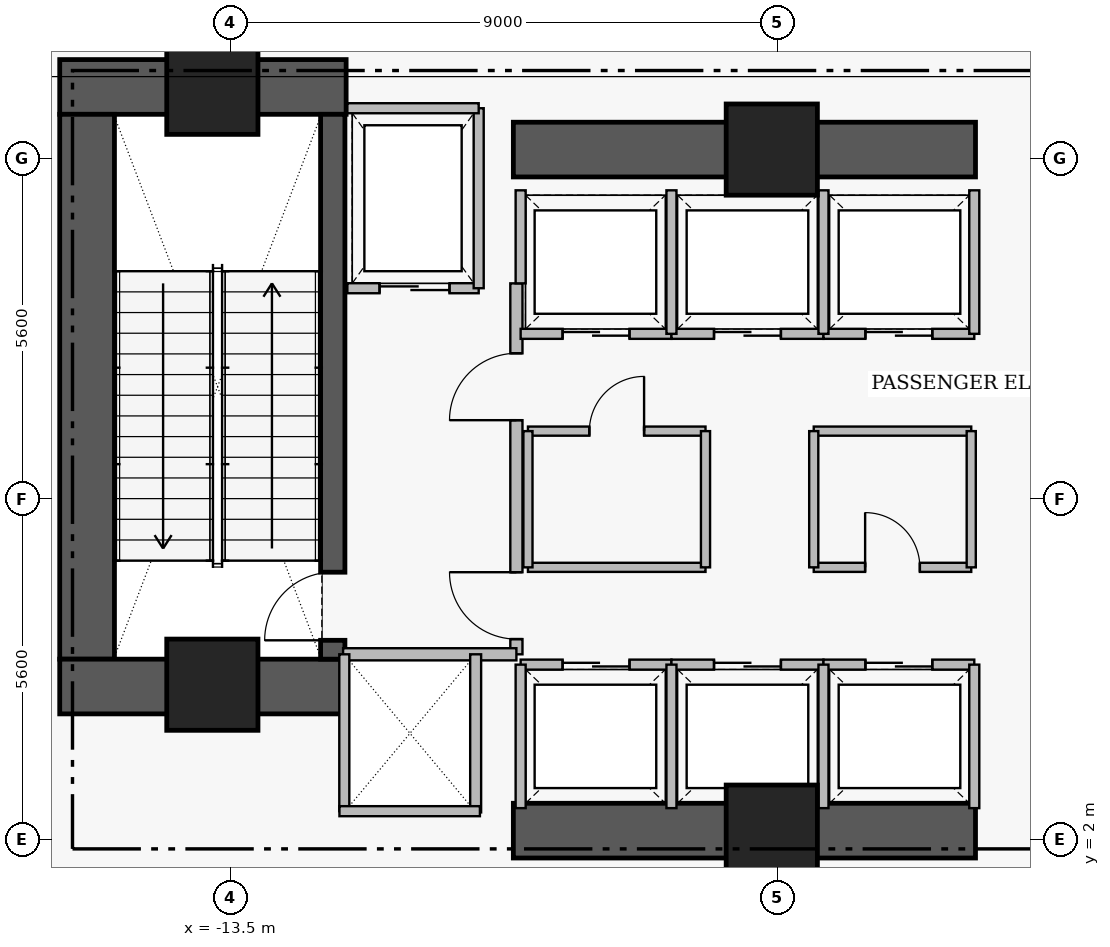
"""IFC4 building model, lengths in metres.
Left out: names, types, materials, properties, quantities, classifications, styles, units other than length and angle.
Written with IfcOpenShell. Run it as: python <this file> out.ifc"""

import sys

from ifc_helpers import new_model, si_unit, direction, frame, frame_2d, origin, origin_2d, place, context, subcontext, project, spatial, rectangle, extrude, element, fill, save


model = new_model("IFC4")
c1 = context("Model", 3, precision=1e-05, world=origin(), true_north=direction((0.0, 1.0)))
c2 = subcontext(c1, "Body", "Model", "MODEL_VIEW")
j1 = project(units=[si_unit("LENGTHUNIT", "METRE"), si_unit("PLANEANGLEUNIT", "RADIAN")], contexts=[c1])
p1 = place(None, origin())
s1 = spatial("IfcSite", under=j1, at=p1, CompositionType="ELEMENT")
p2 = place(p1, origin())
s2 = spatial("IfcBuilding", under=s1, at=p2, CompositionType="ELEMENT")
p3 = place(p2, frame((0.0, 0.0, 6.0)))
s3 = spatial("IfcBuildingStorey", under=s2, at=p3, CompositionType="ELEMENT", Elevation=6.0)
p4 = place(p3, frame((-16.31, 14.38, 0.0), z_axis=(0.0, 0.0, 1.0), x_axis=(1.0, 0.0, 0.0)))
e1 = element("IfcWall", 1, at=p4, inside=s3, PredefinedType="SHEAR", context=c2, shape_type="SweptSolid", body=[
    extrude(rectangle(XDim=4.71, YDim=0.9, at=frame_2d((2.355, 0.0))), origin(), (0.0, 0.0, 1.0), 5.21),
])
p5 = place(p3, frame((-15.86, 4.97, 0.0), z_axis=(0.0, 0.0, 1.0), x_axis=(0.0, 1.0, 0.0)))
e2 = element("IfcWall", 2, at=p5, inside=s3, PredefinedType="SHEAR", context=c2, shape_type="SweptSolid", body=[
    extrude(rectangle(XDim=8.96, YDim=0.9, at=frame_2d((4.48, 0.0))), origin(), (0.0, 0.0, 1.0), 5.21),
])
p6 = place(p3, frame((-16.31, 4.52, 0.0), z_axis=(0.0, 0.0, 1.0), x_axis=(1.0, 0.0, 0.0)))
e3 = element("IfcWall", 3, at=p6, inside=s3, PredefinedType="SHEAR", context=c2, shape_type="SweptSolid", body=[
    extrude(rectangle(XDim=4.71, YDim=0.9, at=frame_2d((2.355, 0.0))), origin(), (0.0, 0.0, 1.0), 5.21),
])
for number, where, z_axis, x_axis in (
    (4, (-8.85, 2.15, 0.0), (0.0, 0.0, 1.0), (1.0, 0.0, 0.0)),
    (5, (-8.85, 13.35, 0.0), (0.0, 0.0, 1.0), (1.0, 0.0, 0.0)),
):
    element("IfcWall", number, at=place(p3, frame(where, z_axis=z_axis, x_axis=x_axis)), inside=s3, PredefinedType="SHEAR", context=c2, shape_type="SweptSolid", body=[
        extrude(rectangle(XDim=7.6, YDim=0.9, at=frame_2d((3.8, 0.0))), origin(), (0.0, 0.0, 1.0), 5.14),
    ])
p7 = place(p3, frame((-11.82, 4.97, 0.0), z_axis=(0.0, 0.0, 1.0), x_axis=(0.0, 1.0, 0.0)))
e6 = element("IfcWall", 6, at=p7, inside=s3, PredefinedType="SHEAR", context=c2, shape_type="SweptSolid", body=[
    extrude(rectangle(XDim=8.96, YDim=0.4, at=frame_2d((4.48, 0.0))), origin(), (0.0, 0.0, 1.0), 5.21),
])
p8 = place(p7, frame((0.31, 0.0, 0.0)))
e7 = element("IfcOpeningElement", 7, at=p8, cuts=e6, PredefinedType="OPENING", context=c2, shape_type="SweptSolid", body=[
    extrude(rectangle(XDim=1.12, YDim=2.22, at=frame_2d((0.56, 1.11))), frame((0.0, 0.21, 0.0), z_axis=(0.0, -1.0, 0.0), x_axis=(1.0, 0.0, 0.0)), (0.0, 0.0, 1.0), 0.42),
])
for number, where, z_axis, x_axis in (
    (8, (-13.8, 14.35, 0.0), (0.0, 0.0, 1.0), (1.0, 0.0, 0.0)),
    (9, (-4.6, 13.35, 0.0), (0.0, 0.0, 1.0), (1.0, 0.0, 0.0)),
    (10, (-13.8, 4.55, 0.0), (0.0, 0.0, 1.0), (1.0, 0.0, 0.0)),
    (11, (-4.6, 2.15, 0.0), (0.0, 0.0, 1.0), (1.0, 0.0, 0.0)),
):
    element("IfcColumn", number, at=place(p3, frame(where, z_axis=z_axis, x_axis=x_axis)), inside=s3, PredefinedType="COLUMN", context=c2, shape_type="SweptSolid", body=[
        extrude(rectangle(XDim=1.5, YDim=1.5, at=origin_2d()), origin(), (0.0, 0.0, 1.0), 5.4),
    ])
p9 = place(p3, frame((-8.8, 5.05, 0.0), z_axis=(0.0, 0.0, 1.0), x_axis=(0.0, 1.0, 0.0)))
e12 = element("IfcWall", 12, at=p9, inside=s3, PredefinedType="PARTITIONING", context=c2, shape_type="SweptSolid", body=[
    extrude(rectangle(XDim=6.1, YDim=0.2, at=frame_2d((3.05, 0.0))), origin(), (0.0, 0.0, 1.0), 5.14),
])
p10 = place(p9, frame((0.25, 0.0, 0.0)))
e13 = element("IfcOpeningElement", 13, at=p10, cuts=e12, PredefinedType="OPENING", context=c2, shape_type="SweptSolid", body=[
    extrude(rectangle(XDim=1.1, YDim=2.2, at=frame_2d((0.55, 1.1))), frame((0.0, 0.11, 0.0), z_axis=(0.0, -1.0, 0.0), x_axis=(1.0, 0.0, 0.0)), (0.0, 0.0, 1.0), 0.22),
])
p11 = place(p9, frame((3.85, 0.0, 0.0)))
e14 = element("IfcOpeningElement", 14, at=p11, cuts=e12, PredefinedType="OPENING", context=c2, shape_type="SweptSolid", body=[
    extrude(rectangle(XDim=1.1, YDim=2.2, at=frame_2d((0.55, 1.1))), frame((0.0, 0.11, 0.0), z_axis=(0.0, -1.0, 0.0), x_axis=(1.0, 0.0, 0.0)), (0.0, 0.0, 1.0), 0.22),
])
p12 = place(p3, frame((-11.58, 11.07, 0.0), z_axis=(0.0, 0.0, 1.0), x_axis=(1.0, 0.0, 0.0)))
e15 = element("IfcWall", 15, at=p12, inside=s3, PredefinedType="PARTITIONING", context=c2, shape_type="SweptSolid", body=[
    extrude(rectangle(XDim=2.16, YDim=0.165, at=frame_2d((1.08, 0.0))), origin(), (0.0, 0.0, 1.0), 5.14),
])
p13 = place(p12, frame((0.53, 0.0, 0.0)))
e16 = element("IfcOpeningElement", 16, at=p13, cuts=e15, PredefinedType="OPENING", context=c2, shape_type="SweptSolid", body=[
    extrude(rectangle(XDim=1.15, YDim=2.25, at=frame_2d((0.575, 1.125))), frame((0.0, 0.093, 0.0), z_axis=(0.0, -1.0, 0.0), x_axis=(1.0, 0.0, 0.0)), (0.0, 0.0, 1.0), 0.185),
])
p14 = place(p3, frame((-8.73, 4.88, 0.0), z_axis=(0.0, 0.0, 1.0), x_axis=(1.0, 0.0, 0.0)))
e17 = element("IfcWall", 17, at=p14, inside=s3, PredefinedType="PARTITIONING", context=c2, shape_type="SweptSolid", body=[
    extrude(rectangle(XDim=2.48, YDim=0.165, at=frame_2d((1.24, 0.0))), origin(), (0.0, 0.0, 1.0), 5.14),
])
p15 = place(p14, frame((0.69, 0.0, 0.0)))
e18 = element("IfcOpeningElement", 18, at=p15, cuts=e17, PredefinedType="OPENING", context=c2, shape_type="SweptSolid", body=[
    extrude(rectangle(XDim=1.1, YDim=2.25, at=frame_2d((0.55, 1.125))), frame((0.0, 0.093, 0.0), z_axis=(0.0, -1.0, 0.0), x_axis=(1.0, 0.0, 0.0)), (0.0, 0.0, 1.0), 0.185),
])
p16 = place(p3, frame((-6.25, 4.88, 0.0), z_axis=(0.0, 0.0, 1.0), x_axis=(1.0, 0.0, 0.0)))
e19 = element("IfcWall", 19, at=p16, inside=s3, PredefinedType="PARTITIONING", context=c2, shape_type="SweptSolid", body=[
    extrude(rectangle(XDim=2.5, YDim=0.165, at=frame_2d((1.25, 0.0))), origin(), (0.0, 0.0, 1.0), 5.14),
])
p17 = place(p16, frame((0.7, 0.0, 0.0)))
e20 = element("IfcOpeningElement", 20, at=p17, cuts=e19, PredefinedType="OPENING", context=c2, shape_type="SweptSolid", body=[
    extrude(rectangle(XDim=1.1, YDim=2.25, at=frame_2d((0.55, 1.125))), frame((0.0, 0.093, 0.0), z_axis=(0.0, -1.0, 0.0), x_axis=(1.0, 0.0, 0.0)), (0.0, 0.0, 1.0), 0.185),
])
p18 = place(p3, frame((-8.73, 10.32, 0.0), z_axis=(0.0, 0.0, 1.0), x_axis=(1.0, 0.0, 0.0)))
e21 = element("IfcWall", 21, at=p18, inside=s3, PredefinedType="PARTITIONING", context=c2, shape_type="SweptSolid", body=[
    extrude(rectangle(XDim=2.48, YDim=0.165, at=frame_2d((1.24, 0.0))), origin(), (0.0, 0.0, 1.0), 5.14),
])
p19 = place(p18, frame((0.69, 0.0, 0.0)))
e22 = element("IfcOpeningElement", 22, at=p19, cuts=e21, PredefinedType="OPENING", context=c2, shape_type="SweptSolid", body=[
    extrude(rectangle(XDim=1.1, YDim=2.25, at=frame_2d((0.55, 1.125))), frame((0.0, 0.093, 0.0), z_axis=(0.0, -1.0, 0.0), x_axis=(1.0, 0.0, 0.0)), (0.0, 0.0, 1.0), 0.185),
])
p20 = place(p3, frame((-6.25, 10.32, 0.0), z_axis=(0.0, 0.0, 1.0), x_axis=(1.0, 0.0, 0.0)))
e23 = element("IfcWall", 23, at=p20, inside=s3, PredefinedType="PARTITIONING", context=c2, shape_type="SweptSolid", body=[
    extrude(rectangle(XDim=2.5, YDim=0.165, at=frame_2d((1.25, 0.0))), origin(), (0.0, 0.0, 1.0), 5.14),
])
p21 = place(p20, frame((0.7, 0.0, 0.0)))
e24 = element("IfcOpeningElement", 24, at=p21, cuts=e23, PredefinedType="OPENING", context=c2, shape_type="SweptSolid", body=[
    extrude(rectangle(XDim=1.1, YDim=2.25, at=frame_2d((0.55, 1.125))), frame((0.0, 0.093, 0.0), z_axis=(0.0, -1.0, 0.0), x_axis=(1.0, 0.0, 0.0)), (0.0, 0.0, 1.0), 0.185),
])
p22 = place(p3, frame((-3.75, 4.88, 0.0), z_axis=(0.0, 0.0, 1.0), x_axis=(1.0, 0.0, 0.0)))
e25 = element("IfcWall", 25, at=p22, inside=s3, PredefinedType="PARTITIONING", context=c2, shape_type="SweptSolid", body=[
    extrude(rectangle(XDim=2.48, YDim=0.165, at=frame_2d((1.24, 0.0))), origin(), (0.0, 0.0, 1.0), 5.14),
])
p23 = place(p22, frame((0.69, 0.0, 0.0)))
e26 = element("IfcOpeningElement", 26, at=p23, cuts=e25, PredefinedType="OPENING", context=c2, shape_type="SweptSolid", body=[
    extrude(rectangle(XDim=1.1, YDim=2.25, at=frame_2d((0.55, 1.125))), frame((0.0, 0.093, 0.0), z_axis=(0.0, -1.0, 0.0), x_axis=(1.0, 0.0, 0.0)), (0.0, 0.0, 1.0), 0.185),
])
p24 = place(p3, frame((-3.75, 10.32, 0.0), z_axis=(0.0, 0.0, 1.0), x_axis=(1.0, 0.0, 0.0)))
e27 = element("IfcWall", 27, at=p24, inside=s3, PredefinedType="PARTITIONING", context=c2, shape_type="SweptSolid", body=[
    extrude(rectangle(XDim=2.48, YDim=0.165, at=frame_2d((1.24, 0.0))), origin(), (0.0, 0.0, 1.0), 5.14),
])
p25 = place(p24, frame((0.69, 0.0, 0.0)))
e28 = element("IfcOpeningElement", 28, at=p25, cuts=e27, PredefinedType="OPENING", context=c2, shape_type="SweptSolid", body=[
    extrude(rectangle(XDim=1.1, YDim=2.25, at=frame_2d((0.55, 1.125))), frame((0.0, 0.093, 0.0), z_axis=(0.0, -1.0, 0.0), x_axis=(1.0, 0.0, 0.0)), (0.0, 0.0, 1.0), 0.185),
])
p26 = place(p3, frame((-8.61, 8.72, 0.0), z_axis=(0.0, 0.0, 1.0), x_axis=(1.0, 0.0, 0.0)))
e29 = element("IfcWall", 29, at=p26, inside=s3, PredefinedType="PARTITIONING", context=c2, shape_type="SweptSolid", body=[
    extrude(rectangle(XDim=2.92, YDim=0.15, at=frame_2d((1.46, 0.0))), origin(), (0.0, 0.0, 1.0), 5.14),
])
p27 = place(p26, frame((1.01, 0.0, 0.0)))
e30 = element("IfcOpeningElement", 30, at=p27, cuts=e29, PredefinedType="OPENING", context=c2, shape_type="SweptSolid", body=[
    extrude(rectangle(XDim=0.9, YDim=2.15, at=frame_2d((0.45, 1.075))), frame((0.0, 0.085, 0.0), z_axis=(0.0, -1.0, 0.0), x_axis=(1.0, 0.0, 0.0)), (0.0, 0.0, 1.0), 0.17),
])
p28 = place(p3, frame((-3.91, 6.48, 0.0), z_axis=(0.0, 0.0, 1.0), x_axis=(1.0, 0.0, 0.0)))
e31 = element("IfcWall", 31, at=p28, inside=s3, PredefinedType="PARTITIONING", context=c2, shape_type="SweptSolid", body=[
    extrude(rectangle(XDim=2.59, YDim=0.15, at=frame_2d((1.295, 0.0))), origin(), (0.0, 0.0, 1.0), 5.14),
])
p29 = place(p28, frame((0.845, 0.0, 0.0)))
e32 = element("IfcOpeningElement", 32, at=p29, cuts=e31, PredefinedType="OPENING", context=c2, shape_type="SweptSolid", body=[
    extrude(rectangle(XDim=0.9, YDim=2.15, at=frame_2d((0.45, 1.075))), frame((0.0, 0.085, 0.0), z_axis=(0.0, -1.0, 0.0), x_axis=(1.0, 0.0, 0.0)), (0.0, 0.0, 1.0), 0.17),
])
p30 = place(p3, frame((-11.65, 5.05, 0.0), z_axis=(0.0, 0.0, 1.0), x_axis=(1.0, 0.0, 0.0)))
e33 = element("IfcWall", 33, at=p30, inside=s3, PredefinedType="PARTITIONING", context=c2, shape_type="SweptSolid", body=[
    extrude(rectangle(XDim=2.85, YDim=0.2, at=frame_2d((1.425, 0.0))), origin(), (0.0, 0.0, 1.0), 5.14),
])
p31 = place(p3, frame((-9.42, 11.07, 0.0), z_axis=(0.0, 0.0, 1.0), x_axis=(0.0, 1.0, 0.0)))
e34 = element("IfcWall", 34, at=p31, inside=s3, PredefinedType="PARTITIONING", context=c2, shape_type="SweptSolid", body=[
    extrude(rectangle(XDim=2.96, YDim=0.165, at=frame_2d((1.48, 0.0))), origin(), (0.0, 0.0, 1.0), 5.14),
])
p32 = place(p3, frame((-11.58, 14.03, 0.0), z_axis=(0.0, 0.0, 1.0), x_axis=(1.0, 0.0, 0.0)))
e35 = element("IfcWall", 35, at=p32, inside=s3, PredefinedType="PARTITIONING", context=c2, shape_type="SweptSolid", body=[
    extrude(rectangle(XDim=2.16, YDim=0.165, at=frame_2d((1.08, 0.0))), origin(), (0.0, 0.0, 1.0), 5.14),
])
for number, where, z_axis, x_axis in (
    (36, (-8.73, 2.52, 0.0), (0.0, 0.0, 1.0), (0.0, 1.0, 0.0)),
    (37, (-6.25, 2.52, 0.0), (0.0, 0.0, 1.0), (0.0, 1.0, 0.0)),
    (38, (-3.75, 2.52, 0.0), (0.0, 0.0, 1.0), (0.0, 1.0, 0.0)),
):
    element("IfcWall", number, at=place(p3, frame(where, z_axis=z_axis, x_axis=x_axis)), inside=s3, PredefinedType="PARTITIONING", context=c2, shape_type="SweptSolid", body=[
        extrude(rectangle(XDim=2.36, YDim=0.165, at=frame_2d((1.18, 0.0))), origin(), (0.0, 0.0, 1.0), 5.14),
    ])
p33 = place(p3, frame((-8.73, 11.15, 0.0), z_axis=(0.0, 0.0, 1.0), x_axis=(0.0, 1.0, 0.0)))
e39 = element("IfcWall", 39, at=p33, inside=s3, PredefinedType="PARTITIONING", context=c2, shape_type="SweptSolid", body=[
    extrude(rectangle(XDim=1.53, YDim=0.165, at=frame_2d((0.765, 0.0))), origin(), (0.0, 0.0, 1.0), 5.14),
])
for number, where, z_axis, x_axis in (
    (40, (-6.25, 10.32, 0.0), (0.0, 0.0, 1.0), (0.0, 1.0, 0.0)),
    (41, (-3.75, 10.32, 0.0), (0.0, 0.0, 1.0), (0.0, 1.0, 0.0)),
    (42, (-1.27, 2.52, 0.0), (0.0, 0.0, 1.0), (0.0, 1.0, 0.0)),
    (43, (-1.27, 10.32, 0.0), (0.0, 0.0, 1.0), (0.0, 1.0, 0.0)),
):
    element("IfcWall", number, at=place(p3, frame(where, z_axis=z_axis, x_axis=x_axis)), inside=s3, PredefinedType="PARTITIONING", context=c2, shape_type="SweptSolid", body=[
        extrude(rectangle(XDim=2.36, YDim=0.165, at=frame_2d((1.18, 0.0))), origin(), (0.0, 0.0, 1.0), 5.14),
    ])
p34 = place(p3, frame((-9.47, 2.45, 0.0), z_axis=(0.0, 0.0, 1.0), x_axis=(0.0, 1.0, 0.0)))
e44 = element("IfcWall", 44, at=p34, inside=s3, PredefinedType="PARTITIONING", context=c2, shape_type="SweptSolid", body=[
    extrude(rectangle(XDim=2.6, YDim=0.18, at=frame_2d((1.3, 0.0))), origin(), (0.0, 0.0, 1.0), 5.14),
])
p35 = place(p3, frame((-11.63, 2.47, 0.0), z_axis=(0.0, 0.0, 1.0), x_axis=(0.0, 1.0, 0.0)))
e45 = element("IfcWall", 45, at=p35, inside=s3, PredefinedType="PARTITIONING", context=c2, shape_type="SweptSolid", body=[
    extrude(rectangle(XDim=2.58, YDim=0.165, at=frame_2d((1.29, 0.0))), origin(), (0.0, 0.0, 1.0), 5.14),
])
p36 = place(p3, frame((-11.71, 2.47, 0.0), z_axis=(0.0, 0.0, 1.0), x_axis=(1.0, 0.0, 0.0)))
e46 = element("IfcWall", 46, at=p36, inside=s3, PredefinedType="PARTITIONING", context=c2, shape_type="SweptSolid", body=[
    extrude(rectangle(XDim=2.31, YDim=0.165, at=frame_2d((1.155, 0.0))), origin(), (0.0, 0.0, 1.0), 3.74),
])
p37 = place(p3, frame((-8.61, 6.48, 0.0), z_axis=(0.0, 0.0, 1.0), x_axis=(1.0, 0.0, 0.0)))
e47 = element("IfcWall", 47, at=p37, inside=s3, PredefinedType="PARTITIONING", context=c2, shape_type="SweptSolid", body=[
    extrude(rectangle(XDim=2.92, YDim=0.15, at=frame_2d((1.46, 0.0))), origin(), (0.0, 0.0, 1.0), 5.14),
])
for number, where, z_axis, x_axis in (
    (48, (-8.61, 6.48, 0.0), (0.0, 0.0, 1.0), (0.0, 1.0, 0.0)),
    (49, (-5.69, 6.48, 0.0), (0.0, 0.0, 1.0), (0.0, 1.0, 0.0)),
):
    element("IfcWall", number, at=place(p3, frame(where, z_axis=z_axis, x_axis=x_axis)), inside=s3, PredefinedType="PARTITIONING", context=c2, shape_type="SweptSolid", body=[
        extrude(rectangle(XDim=2.24, YDim=0.15, at=frame_2d((1.12, 0.0))), origin(), (0.0, 0.0, 1.0), 5.14),
    ])
p38 = place(p3, frame((-3.91, 8.72, 0.0), z_axis=(0.0, 0.0, 1.0), x_axis=(1.0, 0.0, 0.0)))
e50 = element("IfcWall", 50, at=p38, inside=s3, PredefinedType="PARTITIONING", context=c2, shape_type="SweptSolid", body=[
    extrude(rectangle(XDim=2.59, YDim=0.15, at=frame_2d((1.295, 0.0))), origin(), (0.0, 0.0, 1.0), 5.14),
])
for number, where, z_axis, x_axis in (
    (51, (-3.91, 6.48, 0.0), (0.0, 0.0, 1.0), (0.0, 1.0, 0.0)),
    (52, (-1.32, 6.48, 0.0), (0.0, 0.0, 1.0), (0.0, 1.0, 0.0)),
):
    element("IfcWall", number, at=place(p3, frame(where, z_axis=z_axis, x_axis=x_axis)), inside=s3, PredefinedType="PARTITIONING", context=c2, shape_type="SweptSolid", body=[
        extrude(rectangle(XDim=2.24, YDim=0.15, at=frame_2d((1.12, 0.0))), origin(), (0.0, 0.0, 1.0), 5.14),
    ])
p39 = place(p8, origin())
e53 = element("IfcDoor", 53, at=p39, inside=s3, OperationType="SINGLE_SWING_LEFT", PredefinedType="DOOR", context=c2, shape_type="SweptSolid", body=[
    extrude(rectangle(XDim=1.12, YDim=2.22, at=frame_2d((0.56, 1.11))), frame((0.0, 0.025, 0.0), z_axis=(0.0, -1.0, 0.0), x_axis=(1.0, 0.0, 0.0)), (0.0, 0.0, 1.0), 0.05),
])
fill(e7, e53)
p40 = place(p10, origin())
e54 = element("IfcDoor", 54, at=p40, inside=s3, OperationType="SINGLE_SWING_RIGHT", PredefinedType="DOOR", context=c2, shape_type="SweptSolid", body=[
    extrude(rectangle(XDim=1.1, YDim=2.2, at=frame_2d((0.55, 1.1))), frame((0.0, 0.025, 0.0), z_axis=(0.0, -1.0, 0.0), x_axis=(1.0, 0.0, 0.0)), (0.0, 0.0, 1.0), 0.05),
])
fill(e13, e54)
p41 = place(p11, origin())
e55 = element("IfcDoor", 55, at=p41, inside=s3, OperationType="SINGLE_SWING_LEFT", PredefinedType="DOOR", context=c2, shape_type="SweptSolid", body=[
    extrude(rectangle(XDim=1.1, YDim=2.2, at=frame_2d((0.55, 1.1))), frame((0.0, 0.025, 0.0), z_axis=(0.0, -1.0, 0.0), x_axis=(1.0, 0.0, 0.0)), (0.0, 0.0, 1.0), 0.05),
])
fill(e14, e55)
p42 = place(p13, origin())
e56 = element("IfcDoor", 56, at=p42, inside=s3, OperationType="SLIDING_TO_LEFT", PredefinedType="DOOR", context=c2, shape_type="SweptSolid", body=[
    extrude(rectangle(XDim=1.15, YDim=2.25, at=frame_2d((0.575, 1.125))), frame((0.0, 0.025, 0.0), z_axis=(0.0, -1.0, 0.0), x_axis=(1.0, 0.0, 0.0)), (0.0, 0.0, 1.0), 0.05),
])
fill(e16, e56)
p43 = place(p15, origin())
e57 = element("IfcDoor", 57, at=p43, inside=s3, OperationType="SLIDING_TO_LEFT", PredefinedType="DOOR", context=c2, shape_type="SweptSolid", body=[
    extrude(rectangle(XDim=1.1, YDim=2.25, at=frame_2d((0.55, 1.125))), frame((0.0, 0.025, 0.0), z_axis=(0.0, -1.0, 0.0), x_axis=(1.0, 0.0, 0.0)), (0.0, 0.0, 1.0), 0.05),
])
fill(e18, e57)
p44 = place(p17, origin())
e58 = element("IfcDoor", 58, at=p44, inside=s3, OperationType="SLIDING_TO_LEFT", PredefinedType="DOOR", context=c2, shape_type="SweptSolid", body=[
    extrude(rectangle(XDim=1.1, YDim=2.25, at=frame_2d((0.55, 1.125))), frame((0.0, 0.025, 0.0), z_axis=(0.0, -1.0, 0.0), x_axis=(1.0, 0.0, 0.0)), (0.0, 0.0, 1.0), 0.05),
])
fill(e20, e58)
p45 = place(p19, origin())
e59 = element("IfcDoor", 59, at=p45, inside=s3, OperationType="SLIDING_TO_LEFT", PredefinedType="DOOR", context=c2, shape_type="SweptSolid", body=[
    extrude(rectangle(XDim=1.1, YDim=2.25, at=frame_2d((0.55, 1.125))), frame((0.0, 0.025, 0.0), z_axis=(0.0, -1.0, 0.0), x_axis=(1.0, 0.0, 0.0)), (0.0, 0.0, 1.0), 0.05),
])
fill(e22, e59)
p46 = place(p21, origin())
e60 = element("IfcDoor", 60, at=p46, inside=s3, OperationType="SLIDING_TO_LEFT", PredefinedType="DOOR", context=c2, shape_type="SweptSolid", body=[
    extrude(rectangle(XDim=1.1, YDim=2.25, at=frame_2d((0.55, 1.125))), frame((0.0, 0.025, 0.0), z_axis=(0.0, -1.0, 0.0), x_axis=(1.0, 0.0, 0.0)), (0.0, 0.0, 1.0), 0.05),
])
fill(e24, e60)
p47 = place(p23, origin())
e61 = element("IfcDoor", 61, at=p47, inside=s3, OperationType="SLIDING_TO_LEFT", PredefinedType="DOOR", context=c2, shape_type="SweptSolid", body=[
    extrude(rectangle(XDim=1.1, YDim=2.25, at=frame_2d((0.55, 1.125))), frame((0.0, 0.025, 0.0), z_axis=(0.0, -1.0, 0.0), x_axis=(1.0, 0.0, 0.0)), (0.0, 0.0, 1.0), 0.05),
])
fill(e26, e61)
p48 = place(p25, origin())
e62 = element("IfcDoor", 62, at=p48, inside=s3, OperationType="SLIDING_TO_LEFT", PredefinedType="DOOR", context=c2, shape_type="SweptSolid", body=[
    extrude(rectangle(XDim=1.1, YDim=2.25, at=frame_2d((0.55, 1.125))), frame((0.0, 0.025, 0.0), z_axis=(0.0, -1.0, 0.0), x_axis=(1.0, 0.0, 0.0)), (0.0, 0.0, 1.0), 0.05),
])
fill(e28, e62)
p49 = place(p27, origin())
e63 = element("IfcDoor", 63, at=p49, inside=s3, OperationType="SINGLE_SWING_RIGHT", PredefinedType="DOOR", context=c2, shape_type="SweptSolid", body=[
    extrude(rectangle(XDim=0.9, YDim=2.15, at=frame_2d((0.45, 1.075))), frame((0.0, 0.025, 0.0), z_axis=(0.0, -1.0, 0.0), x_axis=(1.0, 0.0, 0.0)), (0.0, 0.0, 1.0), 0.05),
])
fill(e30, e63)
p50 = place(p29, origin())
e64 = element("IfcDoor", 64, at=p50, inside=s3, OperationType="SINGLE_SWING_LEFT", PredefinedType="DOOR", context=c2, shape_type="SweptSolid", body=[
    extrude(rectangle(XDim=0.9, YDim=2.15, at=frame_2d((0.45, 1.075))), frame((0.0, 0.025, 0.0), z_axis=(0.0, -1.0, 0.0), x_axis=(1.0, 0.0, 0.0)), (0.0, 0.0, 1.0), 0.05),
])
fill(e32, e64)
save(model, sys.argv[1])
